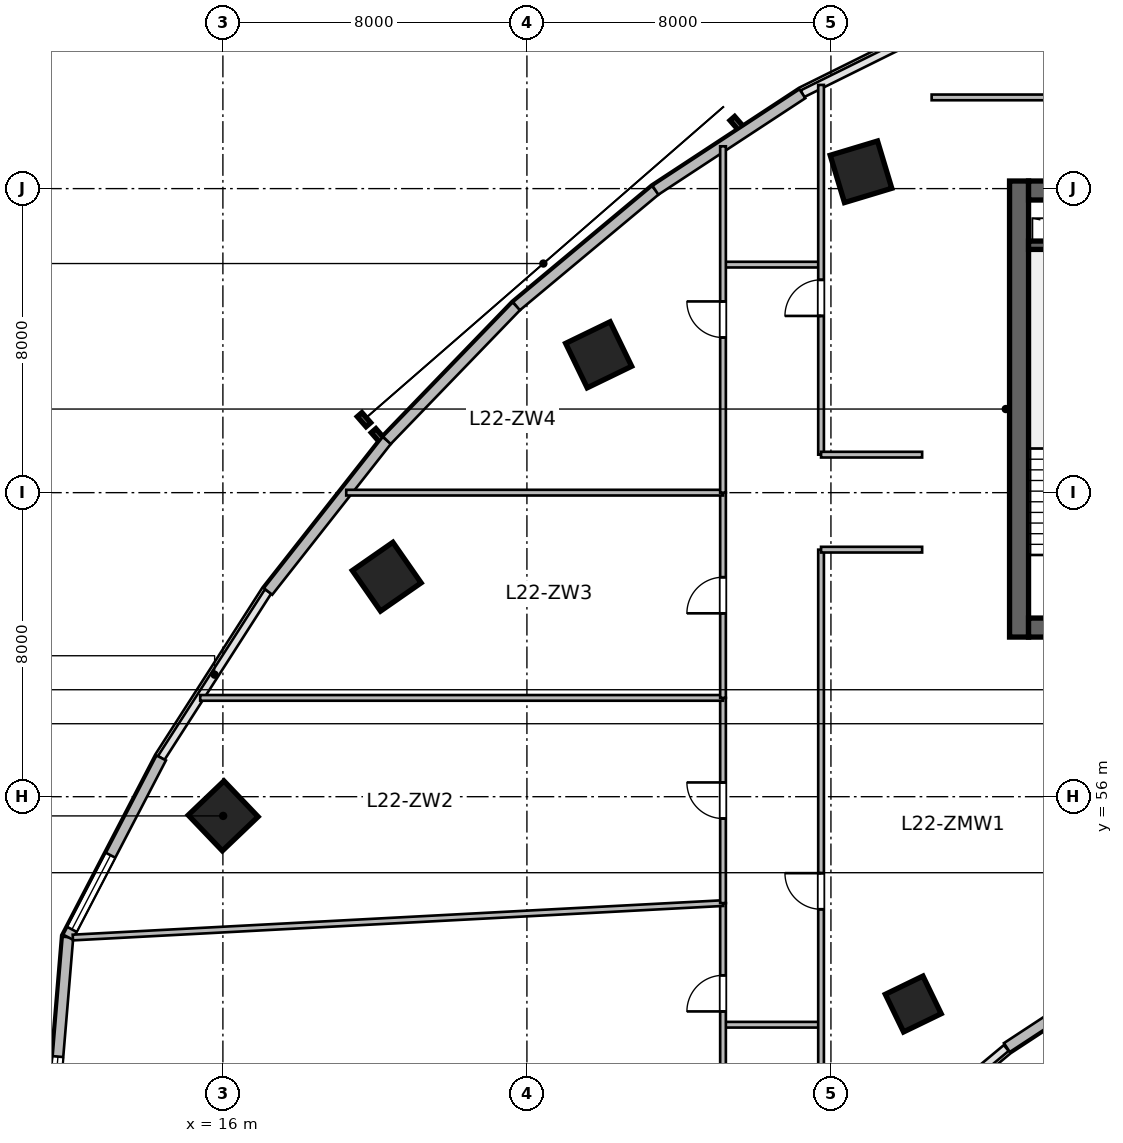
"""IFC4 building model, lengths in metres.
Left out: names, types, materials, properties, quantities, classifications, styles, units other than length and angle.
Written with IfcOpenShell. Run it as: python <this file> out.ifc"""

import sys

from ifc_helpers import new_model, si_unit, direction, frame, frame_2d, origin, origin_2d, place, context, subcontext, project, spatial, rectangle, extrude, source, transform, mapped, element, fill, save


model = new_model("IFC4")
c1 = context("Model", 3, precision=1e-05, world=origin(), true_north=direction((0.0, 1.0)))
c2 = subcontext(c1, "Body", "Model", "MODEL_VIEW")
j1 = project(units=[si_unit("LENGTHUNIT", "METRE"), si_unit("PLANEANGLEUNIT", "RADIAN")], contexts=[c1])
p1 = place(None, origin())
s1 = spatial("IfcSite", under=j1, at=p1, CompositionType="ELEMENT")
p2 = place(p1, origin())
s2 = spatial("IfcBuilding", under=s1, at=p2, CompositionType="ELEMENT")
p3 = place(p2, frame((0.0, 0.0, 96.0)))
s3 = spatial("IfcBuildingStorey", under=s2, at=p3, CompositionType="ELEMENT", Elevation=96.0)
m1 = source(origin(), c2, "Body", "SweptSolid", [
    extrude(rectangle(XDim=12.0, YDim=0.5, at=frame_2d((6.0, 0.0))), origin(), (0.0, 0.0, 1.0), 3.9),
])
p4 = place(p3, frame((36.95, 60.2, 0.0), z_axis=(0.0, 0.0, 1.0), x_axis=(0.0, 1.0, 0.0)))
e1 = element("IfcWall", 1, at=p4, inside=s3, PredefinedType="SHEAR", context=c2, shape_type="MappedRepresentation", body=[
    mapped(m1, transform((0.0, 0.0, 0.0), scale=1.0)),
])
m2 = source(origin(), c2, "Body", "SweptSolid", [
    extrude(rectangle(XDim=21.6, YDim=0.5, at=frame_2d((10.8, 0.0))), origin(), (0.0, 0.0, 1.0), 3.9),
])
p5 = place(p3, frame((37.2, 60.45, 0.0), z_axis=(0.0, 0.0, 1.0), x_axis=(1.0, 0.0, 0.0)))
e2 = element("IfcWall", 2, at=p5, inside=s3, PredefinedType="SHEAR", context=c2, shape_type="MappedRepresentation", body=[
    mapped(m2, transform((0.0, 0.0, 0.0), scale=1.0)),
])
p6 = place(p5, frame((1.1, 0.0, 0.0)))
e3 = element("IfcOpeningElement", 3, at=p6, cuts=e2, PredefinedType="OPENING", context=c2, shape_type="SweptSolid", body=[
    extrude(rectangle(XDim=1.15, YDim=2.15, at=frame_2d((0.575, 1.075))), frame((0.0, 0.26, 0.0), z_axis=(0.0, -1.0, 0.0), x_axis=(1.0, 0.0, 0.0)), (0.0, 0.0, 1.0), 0.52),
])
p7 = place(p5, frame((19.5, 0.0, 0.0)))
e4 = element("IfcOpeningElement", 4, at=p7, cuts=e2, PredefinedType="OPENING", context=c2, shape_type="SweptSolid", body=[
    extrude(rectangle(XDim=0.9, YDim=2.1, at=frame_2d((0.45, 1.05))), frame((0.0, 0.26, 0.0), z_axis=(0.0, -1.0, 0.0), x_axis=(1.0, 0.0, 0.0)), (0.0, 0.0, 1.0), 0.52),
])
p8 = place(p5, frame((12.02, 0.0, 0.0)))
e5 = element("IfcOpeningElement", 5, at=p8, cuts=e2, PredefinedType="OPENING", context=c2, shape_type="SweptSolid", body=[
    extrude(rectangle(XDim=1.6, YDim=2.15, at=frame_2d((0.8, 1.075))), frame((0.0, 0.26, 0.0), z_axis=(0.0, -1.0, 0.0), x_axis=(1.0, 0.0, 0.0)), (0.0, 0.0, 1.0), 0.52),
])
p9 = place(p3, frame((37.2, 71.95, 0.0), z_axis=(0.0, 0.0, 1.0), x_axis=(1.0, 0.0, 0.0)))
e6 = element("IfcWall", 6, at=p9, inside=s3, PredefinedType="SHEAR", context=c2, shape_type="MappedRepresentation", body=[
    mapped(m2, transform((0.0, 0.0, 0.0), scale=1.0)),
])
p10 = place(p9, frame((1.2, 0.0, 0.0)))
e7 = element("IfcOpeningElement", 7, at=p10, cuts=e6, PredefinedType="OPENING", context=c2, shape_type="SweptSolid", body=[
    extrude(rectangle(XDim=0.9, YDim=2.1, at=frame_2d((0.45, 1.05))), frame((0.0, 0.26, 0.0), z_axis=(0.0, -1.0, 0.0), x_axis=(1.0, 0.0, 0.0)), (0.0, 0.0, 1.0), 0.52),
])
p11 = place(p9, frame((14.7, 0.0, 0.0)))
e8 = element("IfcOpeningElement", 8, at=p11, cuts=e6, PredefinedType="OPENING", context=c2, shape_type="SweptSolid", body=[
    extrude(rectangle(XDim=1.2, YDim=2.15, at=frame_2d((0.6, 1.075))), frame((0.0, 0.26, 0.0), z_axis=(0.0, -1.0, 0.0), x_axis=(1.0, 0.0, 0.0)), (0.0, 0.0, 1.0), 0.52),
])
p12 = place(p9, frame((4.15, 0.0, 0.0)))
e9 = element("IfcOpeningElement", 9, at=p12, cuts=e6, PredefinedType="OPENING", context=c2, shape_type="SweptSolid", body=[
    extrude(rectangle(XDim=1.3, YDim=2.15, at=frame_2d((0.65, 1.075))), frame((0.0, 0.26, 0.0), z_axis=(0.0, -1.0, 0.0), x_axis=(1.0, 0.0, 0.0)), (0.0, 0.0, 1.0), 0.52),
])
p13 = place(p9, frame((7.1, 0.0, 0.0)))
e10 = element("IfcOpeningElement", 10, at=p13, cuts=e6, PredefinedType="OPENING", context=c2, shape_type="SweptSolid", body=[
    extrude(rectangle(XDim=0.9, YDim=2.1, at=frame_2d((0.45, 1.05))), frame((0.0, 0.26, 0.0), z_axis=(0.0, -1.0, 0.0), x_axis=(1.0, 0.0, 0.0)), (0.0, 0.0, 1.0), 0.52),
])
m3 = source(origin(), c2, "Body", "SweptSolid", [
    extrude(rectangle(XDim=3.27, YDim=0.22, at=frame_2d((1.635, 0.0))), origin(), (0.0, 0.0, 1.0), 3.9),
])
p14 = place(p3, frame((37.2, 70.51, 0.0), z_axis=(0.0, 0.0, 1.0), x_axis=(1.0, 0.0, 0.0)))
e11 = element("IfcWall", 11, at=p14, inside=s3, PredefinedType="SHEAR", context=c2, shape_type="MappedRepresentation", body=[
    mapped(m3, transform((0.0, 0.0, 0.0), scale=1.0)),
])
m4 = source(origin(), c2, "Body", "SweptSolid", [
    extrude(rectangle(XDim=1.3, YDim=1.3, at=origin_2d()), origin(), (0.0, 0.0, 1.0), 3.9),
])
for number, where, z_axis, x_axis in (
    (12, (16.007, 55.494, 0.0), (0.0, 0.0, 1.0), (-0.691, 0.723, 0.0)),
    (13, (20.311, 61.789, 0.0), (0.0, 0.0, 1.0), (-0.571, 0.821, 0.0)),
):
    element("IfcColumn", number, at=place(p3, frame(where, z_axis=z_axis, x_axis=x_axis)), inside=s3, PredefinedType="COLUMN", context=c2, shape_type="MappedRepresentation", body=[
        mapped(m4, transform((0.0, 0.0, 0.0), scale=1.0)),
    ])
m5 = source(origin(), c2, "Body", "SweptSolid", [
    extrude(rectangle(XDim=1.1, YDim=1.1, at=origin_2d()), origin(), (0.0, 0.0, 1.0), 3.9),
])
p15 = place(p3, frame((34.166, 50.545, 0.0), z_axis=(0.0, 0.0, 1.0), x_axis=(-0.436173672171, 0.899862504889, 0.0)))
e14 = element("IfcColumn", 14, at=p15, inside=s3, PredefinedType="COLUMN", context=c2, shape_type="MappedRepresentation", body=[
    mapped(m5, transform((0.0, 0.0, 0.0), scale=1.0)),
])
for number, where, z_axis, x_axis in (
    (15, (25.888, 67.627, 0.0), (0.0, 0.0, 1.0), (-0.436, 0.9, 0.0)),
    (16, (32.791, 72.442, 0.0), (0.0, 0.0, 1.0), (-0.289, 0.957, 0.0)),
):
    element("IfcColumn", number, at=place(p3, frame(where, z_axis=z_axis, x_axis=x_axis)), inside=s3, PredefinedType="COLUMN", context=c2, shape_type="MappedRepresentation", body=[
        mapped(m4, transform((0.0, 0.0, 0.0), scale=1.0)),
    ])
m6 = source(origin(), c2, "Body", "SweptSolid", [
    extrude(rectangle(XDim=2.527, YDim=0.28, at=frame_2d((1.264, 0.0))), origin(), (0.0, 0.0, 1.0), 3.65),
])
p16 = place(p3, frame((38.742, 50.786, 0.0), z_axis=(0.0, 0.0, 1.0), x_axis=(-0.836011905051, -0.548711303523, 0.0)))
e17 = element("IfcWall", 17, at=p16, inside=s3, PredefinedType="SOLIDWALL", context=c2, shape_type="MappedRepresentation", body=[
    mapped(m6, transform((0.0, 0.0, 0.0), scale=1.0)),
])
m7 = source(origin(), c2, "Body", "SweptSolid", [
    extrude(rectangle(XDim=5.674, YDim=0.28, at=frame_2d((2.837, 0.0))), origin(), (0.0, 0.0, 1.0), 3.65),
])
p17 = place(p3, frame((11.45, 46.652, 0.0), z_axis=(0.0, 0.0, 1.0), x_axis=(0.083309007867, 0.996523762491, 0.0)))
e18 = element("IfcWall", 18, at=p17, inside=s3, PredefinedType="SOLIDWALL", context=c2, shape_type="MappedRepresentation", body=[
    mapped(m7, transform((0.0, 0.0, 0.0), scale=1.0)),
])
p18 = place(p17, frame((0.318, 0.0, 0.95)))
e19 = element("IfcOpeningElement", 19, at=p18, cuts=e18, PredefinedType="OPENING", context=c2, shape_type="SweptSolid", body=[
    extrude(rectangle(XDim=2.2, YDim=2.1, at=frame_2d((1.1, 1.05))), frame((0.0, 0.15, 0.0), z_axis=(0.0, -1.0, 0.0), x_axis=(1.0, 0.0, 0.0)), (0.0, 0.0, 1.0), 0.3),
])
m8 = source(origin(), c2, "Body", "SweptSolid", [
    extrude(rectangle(XDim=5.315, YDim=0.28, at=frame_2d((2.658, 0.0))), origin(), (0.0, 0.0, 1.0), 3.65),
])
p19 = place(p3, frame((11.922, 52.305, 0.0), z_axis=(0.0, 0.0, 1.0), x_axis=(0.461760527822, 0.887004630735, 0.0)))
e20 = element("IfcWall", 20, at=p19, inside=s3, PredefinedType="SOLIDWALL", context=c2, shape_type="MappedRepresentation", body=[
    mapped(m8, transform((0.0, 0.0, 0.0), scale=1.0)),
])
p20 = place(p19, frame((0.229, 0.0, 0.95)))
e21 = element("IfcOpeningElement", 21, at=p20, cuts=e20, PredefinedType="OPENING", context=c2, shape_type="SweptSolid", body=[
    extrude(rectangle(XDim=2.2, YDim=2.1, at=frame_2d((1.1, 1.05))), frame((0.0, 0.15, 0.0), z_axis=(0.0, -1.0, 0.0), x_axis=(1.0, 0.0, 0.0)), (0.0, 0.0, 1.0), 0.3),
])
m9 = source(origin(), c2, "Body", "SweptSolid", [
    extrude(rectangle(XDim=5.058, YDim=0.28, at=frame_2d((2.529, 0.0))), origin(), (0.0, 0.0, 1.0), 3.65),
])
p21 = place(p3, frame((17.188, 61.4, 0.0), z_axis=(0.0, 0.0, 1.0), x_axis=(0.618145507434, 0.786063694391, 0.0)))
e22 = element("IfcWall", 22, at=p21, inside=s3, PredefinedType="SOLIDWALL", context=c2, shape_type="MappedRepresentation", body=[
    mapped(m9, transform((0.0, 0.0, 0.0), scale=1.0)),
])
m10 = source(origin(), c2, "Body", "SweptSolid", [
    extrude(rectangle(XDim=4.908, YDim=0.28, at=frame_2d((2.454, 0.0))), origin(), (0.0, 0.0, 1.0), 3.65),
])
p22 = place(p3, frame((20.315, 65.376, 0.0), z_axis=(0.0, 0.0, 1.0), x_axis=(0.694613154328, 0.719383462302, 0.0)))
e23 = element("IfcWall", 23, at=p22, inside=s3, PredefinedType="SOLIDWALL", context=c2, shape_type="MappedRepresentation", body=[
    mapped(m10, transform((0.0, 0.0, 0.0), scale=1.0)),
])
m11 = source(origin(), c2, "Body", "SweptSolid", [
    extrude(rectangle(XDim=4.762, YDim=0.28, at=frame_2d((2.381, 0.0))), origin(), (0.0, 0.0, 1.0), 3.65),
])
p23 = place(p3, frame((23.725, 68.907, 0.0), z_axis=(0.0, 0.0, 1.0), x_axis=(0.767952279762, 0.640507061638, 0.0)))
e24 = element("IfcWall", 24, at=p23, inside=s3, PredefinedType="SOLIDWALL", context=c2, shape_type="MappedRepresentation", body=[
    mapped(m11, transform((0.0, 0.0, 0.0), scale=1.0)),
])
m12 = source(origin(), c2, "Body", "SweptSolid", [
    extrude(rectangle(XDim=4.626, YDim=0.28, at=frame_2d((2.313, 0.0))), origin(), (0.0, 0.0, 1.0), 3.65),
])
p24 = place(p3, frame((27.382, 71.958, 0.0), z_axis=(0.0, 0.0, 1.0), x_axis=(0.83595938331, 0.548791316855, 0.0)))
e25 = element("IfcWall", 25, at=p24, inside=s3, PredefinedType="SOLIDWALL", context=c2, shape_type="MappedRepresentation", body=[
    mapped(m12, transform((0.0, 0.0, 0.0), scale=1.0)),
])
m13 = source(origin(), c2, "Body", "SweptSolid", [
    extrude(rectangle(XDim=2.5, YDim=0.15, at=frame_2d((1.25, 0.0))), origin(), (0.0, 0.0, 1.0), 3.65),
])
p25 = place(p3, frame((29.2, 50.0, 0.0), z_axis=(0.0, 0.0, 1.0), x_axis=(1.0, 0.0, 0.0)))
e26 = element("IfcWall", 26, at=p25, inside=s3, PredefinedType="PARTITIONING", context=c2, shape_type="MappedRepresentation", body=[
    mapped(m13, transform((0.0, 0.0, 0.0), scale=1.0)),
])
m14 = source(origin(), c2, "Body", "SweptSolid", [
    extrude(rectangle(XDim=2.5, YDim=0.15, at=frame_2d((1.25, 0.0))), origin(), (0.0, 0.0, 1.0), 3.022),
])
p26 = place(p3, frame((29.2, 70.0, 0.0), z_axis=(0.0, 0.0, 1.0), x_axis=(1.0, 0.0, 0.0)))
e27 = element("IfcWall", 27, at=p26, inside=s3, PredefinedType="PARTITIONING", context=c2, shape_type="MappedRepresentation", body=[
    mapped(m14, transform((0.0, 0.0, 0.0), scale=1.0)),
])
m15 = source(origin(), c2, "Body", "SweptSolid", [
    extrude(rectangle(XDim=12.594, YDim=0.15, at=frame_2d((6.297, 0.0))), origin(), (0.0, 0.0, 1.0), 2.942),
])
p27 = place(p3, frame((29.16, 40.606, 0.0), z_axis=(0.0, 0.0, 1.0), x_axis=(0.0, 1.0, 0.0)))
e28 = element("IfcWall", 28, at=p27, inside=s3, PredefinedType="PARTITIONING", context=c2, shape_type="MappedRepresentation", body=[
    mapped(m15, transform((0.0, 0.0, 0.0), scale=1.0)),
])
p28 = place(p27, frame((9.744, 0.0, 0.0)))
e29 = element("IfcOpeningElement", 29, at=p28, cuts=e28, PredefinedType="OPENING", context=c2, shape_type="SweptSolid", body=[
    extrude(rectangle(XDim=0.95, YDim=2.1, at=frame_2d((0.475, 1.05))), frame((0.0, 0.085, 0.0), z_axis=(0.0, -1.0, 0.0), x_axis=(1.0, 0.0, 0.0)), (0.0, 0.0, 1.0), 0.17),
])
m16 = source(origin(), c2, "Body", "SweptSolid", [
    extrude(rectangle(XDim=17.132, YDim=0.15, at=frame_2d((8.566, 0.0))), origin(), (0.0, 0.0, 1.0), 3.65),
])
p29 = place(p3, frame((12.052, 52.294, 0.0), z_axis=(0.0, 0.0, 1.0), x_axis=(0.998601444231, 0.05286923094, 0.0)))
e30 = element("IfcWall", 30, at=p29, inside=s3, PredefinedType="PARTITIONING", context=c2, shape_type="MappedRepresentation", body=[
    mapped(m16, transform((0.0, 0.0, 0.0), scale=1.0)),
])
m17 = source(origin(), c2, "Body", "SweptSolid", [
    extrude(rectangle(XDim=5.4, YDim=0.15, at=frame_2d((2.7, 0.0))), origin(), (0.0, 0.0, 1.0), 3.022),
])
p30 = place(p3, frame((29.16, 53.2, 0.0), z_axis=(0.0, 0.0, 1.0), x_axis=(0.0, 1.0, 0.0)))
e31 = element("IfcWall", 31, at=p30, inside=s3, PredefinedType="PARTITIONING", context=c2, shape_type="MappedRepresentation", body=[
    mapped(m17, transform((0.0, 0.0, 0.0), scale=1.0)),
])
p31 = place(p30, frame((2.225, 0.0, 0.0)))
e32 = element("IfcOpeningElement", 32, at=p31, cuts=e31, PredefinedType="OPENING", context=c2, shape_type="SweptSolid", body=[
    extrude(rectangle(XDim=0.95, YDim=2.1, at=frame_2d((0.475, 1.05))), frame((0.0, 0.085, 0.0), z_axis=(0.0, -1.0, 0.0), x_axis=(1.0, 0.0, 0.0)), (0.0, 0.0, 1.0), 0.17),
])
m18 = source(origin(), c2, "Body", "SweptSolid", [
    extrude(rectangle(XDim=13.757, YDim=0.15, at=frame_2d((6.878, 0.0))), origin(), (0.0, 0.0, 1.0), 3.65),
])
p32 = place(p3, frame((15.403, 58.6, 0.0), z_axis=(0.0, 0.0, 1.0), x_axis=(1.0, 0.0, 0.0)))
e33 = element("IfcWall", 33, at=p32, inside=s3, PredefinedType="PARTITIONING", context=c2, shape_type="MappedRepresentation", body=[
    mapped(m18, transform((0.0, 0.0, 0.0), scale=1.0)),
])
m19 = source(origin(), c2, "Body", "SweptSolid", [
    extrude(rectangle(XDim=5.4, YDim=0.15, at=frame_2d((2.7, 0.0))), origin(), (0.0, 0.0, 1.0), 2.942),
])
p33 = place(p3, frame((29.16, 58.6, 0.0), z_axis=(0.0, 0.0, 1.0), x_axis=(0.0, 1.0, 0.0)))
e34 = element("IfcWall", 34, at=p33, inside=s3, PredefinedType="PARTITIONING", context=c2, shape_type="MappedRepresentation", body=[
    mapped(m19, transform((0.0, 0.0, 0.0), scale=1.0)),
])
p34 = place(p33, frame((2.225, 0.0, 0.0)))
e35 = element("IfcOpeningElement", 35, at=p34, cuts=e34, PredefinedType="OPENING", context=c2, shape_type="SweptSolid", body=[
    extrude(rectangle(XDim=0.95, YDim=2.1, at=frame_2d((0.475, 1.05))), frame((0.0, 0.085, 0.0), z_axis=(0.0, -1.0, 0.0), x_axis=(1.0, 0.0, 0.0)), (0.0, 0.0, 1.0), 0.17),
])
m20 = source(origin(), c2, "Body", "SweptSolid", [
    extrude(rectangle(XDim=9.914, YDim=0.15, at=frame_2d((4.957, 0.0))), origin(), (0.0, 0.0, 1.0), 3.65),
])
p35 = place(p3, frame((19.246, 64.0, 0.0), z_axis=(0.0, 0.0, 1.0), x_axis=(1.0, 0.0, 0.0)))
e36 = element("IfcWall", 36, at=p35, inside=s3, PredefinedType="PARTITIONING", context=c2, shape_type="MappedRepresentation", body=[
    mapped(m20, transform((0.0, 0.0, 0.0), scale=1.0)),
])
m21 = source(origin(), c2, "Body", "SweptSolid", [
    extrude(rectangle(XDim=9.113, YDim=0.15, at=frame_2d((4.557, 0.0))), origin(), (0.0, 0.0, 1.0), 3.65),
])
p36 = place(p3, frame((29.16, 64.0, 0.0), z_axis=(0.0, 0.0, 1.0), x_axis=(0.0, 1.0, 0.0)))
e37 = element("IfcWall", 37, at=p36, inside=s3, PredefinedType="PARTITIONING", context=c2, shape_type="MappedRepresentation", body=[
    mapped(m21, transform((0.0, 0.0, 0.0), scale=1.0)),
])
p37 = place(p36, frame((4.082, 0.0, 0.0)))
e38 = element("IfcOpeningElement", 38, at=p37, cuts=e37, PredefinedType="OPENING", context=c2, shape_type="SweptSolid", body=[
    extrude(rectangle(XDim=0.95, YDim=2.1, at=frame_2d((0.475, 1.05))), frame((0.0, 0.085, 0.0), z_axis=(0.0, -1.0, 0.0), x_axis=(1.0, 0.0, 0.0)), (0.0, 0.0, 1.0), 0.17),
])
m22 = source(origin(), c2, "Body", "SweptSolid", [
    extrude(rectangle(XDim=8.2, YDim=0.15, at=frame_2d((4.1, 0.0))), origin(), (0.0, 0.0, 1.0), 3.022),
])
p38 = place(p3, frame((34.65, 74.4, 0.0), z_axis=(0.0, 0.0, 1.0), x_axis=(1.0, 0.0, 0.0)))
e39 = element("IfcWall", 39, at=p38, inside=s3, PredefinedType="PARTITIONING", context=c2, shape_type="MappedRepresentation", body=[
    mapped(m22, transform((0.0, 0.0, 0.0), scale=1.0)),
])
p39 = place(p38, frame((3.625, 0.0, 0.0)))
e40 = element("IfcOpeningElement", 40, at=p39, cuts=e39, PredefinedType="OPENING", context=c2, shape_type="SweptSolid", body=[
    extrude(rectangle(XDim=0.95, YDim=2.1, at=frame_2d((0.475, 1.05))), frame((0.0, 0.085, 0.0), z_axis=(0.0, -1.0, 0.0), x_axis=(1.0, 0.0, 0.0)), (0.0, 0.0, 1.0), 0.17),
])
m23 = source(origin(), c2, "Body", "SweptSolid", [
    extrude(rectangle(XDim=17.974, YDim=0.15, at=frame_2d((8.987, 0.0))), origin(), (0.0, 0.0, 1.0), 2.942),
])
p40 = place(p3, frame((31.74, 44.526, 0.0), z_axis=(0.0, 0.0, 1.0), x_axis=(0.0, 1.0, 0.0)))
e41 = element("IfcWall", 41, at=p40, inside=s3, PredefinedType="PARTITIONING", context=c2, shape_type="MappedRepresentation", body=[
    mapped(m23, transform((0.0, 0.0, 0.0), scale=1.0)),
])
p41 = place(p40, frame((8.512, 0.0, 0.0)))
e42 = element("IfcOpeningElement", 42, at=p41, cuts=e41, PredefinedType="OPENING", context=c2, shape_type="SweptSolid", body=[
    extrude(rectangle(XDim=0.95, YDim=2.1, at=frame_2d((0.475, 1.05))), frame((0.0, 0.085, 0.0), z_axis=(0.0, -1.0, 0.0), x_axis=(1.0, 0.0, 0.0)), (0.0, 0.0, 1.0), 0.17),
])
m24 = source(origin(), c2, "Body", "SweptSolid", [
    extrude(rectangle(XDim=2.66, YDim=0.15, at=frame_2d((1.33, 0.0))), origin(), (0.0, 0.0, 1.0), 3.65),
])
p42 = place(p3, frame((31.74, 62.5, 0.0), z_axis=(0.0, 0.0, 1.0), x_axis=(1.0, 0.0, 0.0)))
e43 = element("IfcWall", 43, at=p42, inside=s3, PredefinedType="PARTITIONING", context=c2, shape_type="MappedRepresentation", body=[
    mapped(m24, transform((0.0, 0.0, 0.0), scale=1.0)),
])
m25 = source(origin(), c2, "Body", "SweptSolid", [
    extrude(rectangle(XDim=9.729, YDim=0.15, at=frame_2d((4.864, 0.0))), origin(), (0.0, 0.0, 1.0), 3.65),
])
p43 = place(p3, frame((31.74, 65.0, 0.0), z_axis=(0.0, 0.0, 1.0), x_axis=(0.0, 1.0, 0.0)))
e44 = element("IfcWall", 44, at=p43, inside=s3, PredefinedType="PARTITIONING", context=c2, shape_type="MappedRepresentation", body=[
    mapped(m25, transform((0.0, 0.0, 0.0), scale=1.0)),
])
p44 = place(p43, frame((3.65, 0.0, 0.0)))
e45 = element("IfcOpeningElement", 45, at=p44, cuts=e44, PredefinedType="OPENING", context=c2, shape_type="SweptSolid", body=[
    extrude(rectangle(XDim=0.95, YDim=2.1, at=frame_2d((0.475, 1.05))), frame((0.0, 0.085, 0.0), z_axis=(0.0, -1.0, 0.0), x_axis=(1.0, 0.0, 0.0)), (0.0, 0.0, 1.0), 0.17),
])
p45 = place(p3, frame((31.74, 65.0, 0.0), z_axis=(0.0, 0.0, 1.0), x_axis=(1.0, 0.0, 0.0)))
e46 = element("IfcWall", 46, at=p45, inside=s3, PredefinedType="PARTITIONING", context=c2, shape_type="MappedRepresentation", body=[
    mapped(m24, transform((0.0, 0.0, 0.0), scale=1.0)),
])
m26 = source(origin(), c2, "Body", "SweptSolid", [
    extrude(rectangle(XDim=2.2, YDim=2.1, at=frame_2d((1.1, 1.05))), frame((0.0, 0.03, 0.0), z_axis=(0.0, -1.0, 0.0), x_axis=(1.0, 0.0, 0.0)), (0.0, 0.0, 1.0), 0.06),
])
p46 = place(p18, origin())
e47 = element("IfcWindow", 47, at=p46, inside=s3, PartitioningType="TRIPLE_PANEL_VERTICAL", PredefinedType="WINDOW", context=c2, shape_type="MappedRepresentation", body=[
    mapped(m26, transform((0.0, 0.0, 0.0), scale=1.0)),
])
fill(e19, e47)
p47 = place(p20, origin())
e48 = element("IfcWindow", 48, at=p47, inside=s3, PartitioningType="TRIPLE_PANEL_VERTICAL", PredefinedType="WINDOW", context=c2, shape_type="MappedRepresentation", body=[
    mapped(m26, transform((0.0, 0.0, 0.0), scale=1.0)),
])
fill(e21, e48)
m27 = source(origin(), c2, "Body", "SweptSolid", [
    extrude(rectangle(XDim=0.95, YDim=2.1, at=frame_2d((0.475, 1.05))), frame((0.0, 0.025, 0.0), z_axis=(0.0, -1.0, 0.0), x_axis=(1.0, 0.0, 0.0)), (0.0, 0.0, 1.0), 0.05),
])
p48 = place(p28, origin())
e49 = element("IfcDoor", 49, at=p48, inside=s3, OperationType="SINGLE_SWING_LEFT", PredefinedType="DOOR", context=c2, shape_type="MappedRepresentation", body=[
    mapped(m27, transform((0.0, 0.0, 0.0), scale=1.0)),
])
fill(e29, e49)
p49 = place(p31, origin())
e50 = element("IfcDoor", 50, at=p49, inside=s3, OperationType="SINGLE_SWING_RIGHT", PredefinedType="DOOR", context=c2, shape_type="MappedRepresentation", body=[
    mapped(m27, transform((0.0, 0.0, 0.0), scale=1.0)),
])
fill(e32, e50)
p50 = place(p34, origin())
e51 = element("IfcDoor", 51, at=p50, inside=s3, OperationType="SINGLE_SWING_LEFT", PredefinedType="DOOR", context=c2, shape_type="MappedRepresentation", body=[
    mapped(m27, transform((0.0, 0.0, 0.0), scale=1.0)),
])
fill(e35, e51)
p51 = place(p37, origin())
e52 = element("IfcDoor", 52, at=p51, inside=s3, OperationType="SINGLE_SWING_RIGHT", PredefinedType="DOOR", context=c2, shape_type="MappedRepresentation", body=[
    mapped(m27, transform((0.0, 0.0, 0.0), scale=1.0)),
])
fill(e38, e52)
p52 = place(p41, origin())
e53 = element("IfcDoor", 53, at=p52, inside=s3, OperationType="SINGLE_SWING_RIGHT", PredefinedType="DOOR", context=c2, shape_type="MappedRepresentation", body=[
    mapped(m27, transform((0.0, 0.0, 0.0), scale=1.0)),
])
fill(e42, e53)
p53 = place(p44, origin())
e54 = element("IfcDoor", 54, at=p53, inside=s3, OperationType="SINGLE_SWING_LEFT", PredefinedType="DOOR", context=c2, shape_type="MappedRepresentation", body=[
    mapped(m27, transform((0.0, 0.0, 0.0), scale=1.0)),
])
fill(e45, e54)
save(model, sys.argv[1])
